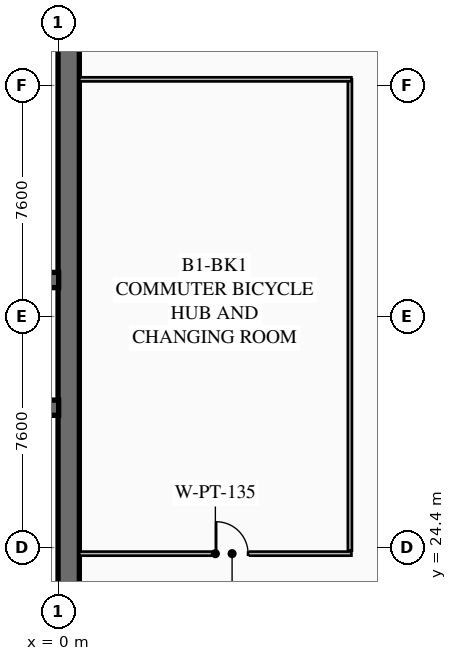
"""IFC4 building model, lengths in metres.
Left out: names, types, materials, properties, quantities, classifications, styles, units other than length and angle.
Written with IfcOpenShell. Run it as: python <this file> out.ifc"""

import sys

from ifc_helpers import new_model, si_unit, direction, frame, frame_2d, origin, place, context, subcontext, project, spatial, rectangle, extrude, element, fill, save


model = new_model("IFC4")
c1 = context("Model", 3, precision=1e-05, world=origin(), true_north=direction((0.0, 1.0)))
c2 = subcontext(c1, "Body", "Model", "MODEL_VIEW")
j1 = project(units=[si_unit("LENGTHUNIT", "METRE"), si_unit("PLANEANGLEUNIT", "RADIAN")], contexts=[c1])
p1 = place(None, origin())
s1 = spatial("IfcSite", under=j1, at=p1, CompositionType="ELEMENT")
p2 = place(p1, origin())
s2 = spatial("IfcBuilding", under=s1, at=p2, CompositionType="ELEMENT")
p3 = place(p2, frame((0.0, 0.0, -5.5)))
s3 = spatial("IfcBuildingStorey", under=s2, at=p3, CompositionType="ELEMENT", Elevation=-5.5)
p4 = place(p3, frame((0.35, 0.0, 0.0), z_axis=(0.0, 0.0, 1.0), x_axis=(0.0, 1.0, 0.0)))
e1 = element("IfcWall", 1, at=p4, inside=s3, PredefinedType="SOLIDWALL", context=c2, shape_type="SweptSolid", body=[
    extrude(rectangle(XDim=63.3, YDim=0.7, at=frame_2d((31.65, 0.0))), origin(), (0.0, 0.0, 1.0), 5.5),
])
p5 = place(p3, frame((-2.35, 29.0, -6.0), z_axis=(0.0, 0.0, 1.0), x_axis=(1.0, 0.0, 0.0)))
e2 = element("IfcWall", 2, at=p5, inside=s3, PredefinedType="SOLIDWALL", context=c2, shape_type="SweptSolid", body=[
    extrude(rectangle(XDim=2.37, YDim=0.5, at=frame_2d((1.185, 0.0))), origin(), (0.0, 0.0, 1.0), 11.15),
])
p6 = place(p3, frame((-2.35, 33.2, -6.0), z_axis=(0.0, 0.0, 1.0), x_axis=(1.0, 0.0, 0.0)))
e3 = element("IfcWall", 3, at=p6, inside=s3, PredefinedType="SOLIDWALL", context=c2, shape_type="SweptSolid", body=[
    extrude(rectangle(XDim=2.37, YDim=0.5, at=frame_2d((1.185, 0.0))), origin(), (0.0, 0.0, 1.0), 11.48),
])
p7 = place(p3, frame((0.7, 24.2, 0.0), z_axis=(0.0, 0.0, 1.0), x_axis=(1.0, 0.0, 0.0)))
e4 = element("IfcWall", 4, at=p7, inside=s3, PredefinedType="PARTITIONING", context=c2, shape_type="SweptSolid", body=[
    extrude(rectangle(XDim=8.95, YDim=0.135, at=frame_2d((4.475, 0.0))), origin(), (0.0, 0.0, 1.0), 4.243),
])
p8 = place(p7, frame((4.5, 0.0, 0.0)))
e5 = element("IfcOpeningElement", 5, at=p8, cuts=e4, PredefinedType="OPENING", context=c2, shape_type="SweptSolid", body=[
    extrude(rectangle(XDim=1.05, YDim=2.2, at=frame_2d((0.525, 1.1))), frame((0.0, 0.077, 0.0), z_axis=(0.0, -1.0, 0.0), x_axis=(1.0, 0.0, 0.0)), (0.0, 0.0, 1.0), 0.155),
])
p9 = place(p3, frame((9.6, 24.3, 0.0), z_axis=(0.0, 0.0, 1.0), x_axis=(0.0, 1.0, 0.0)))
e6 = element("IfcWall", 6, at=p9, inside=s3, PredefinedType="PARTITIONING", context=c2, shape_type="SweptSolid", body=[
    extrude(rectangle(XDim=15.5, YDim=0.135, at=frame_2d((7.75, 0.0))), origin(), (0.0, 0.0, 1.0), 4.243),
])
p10 = place(p3, frame((0.7, 39.8, 0.0), z_axis=(0.0, 0.0, 1.0), x_axis=(1.0, 0.0, 0.0)))
e7 = element("IfcWall", 7, at=p10, inside=s3, PredefinedType="PARTITIONING", context=c2, shape_type="SweptSolid", body=[
    extrude(rectangle(XDim=8.95, YDim=0.135, at=frame_2d((4.475, 0.0))), origin(), (0.0, 0.0, 1.0), 4.243),
])
p11 = place(p8, origin())
e8 = element("IfcDoor", 8, at=p11, inside=s3, OperationType="SINGLE_SWING_LEFT", PredefinedType="DOOR", context=c2, shape_type="SweptSolid", body=[
    extrude(rectangle(XDim=1.05, YDim=2.2, at=frame_2d((0.525, 1.1))), frame((0.0, 0.025, 0.0), z_axis=(0.0, -1.0, 0.0), x_axis=(1.0, 0.0, 0.0)), (0.0, 0.0, 1.0), 0.05),
])
fill(e5, e8)
save(model, sys.argv[1])
